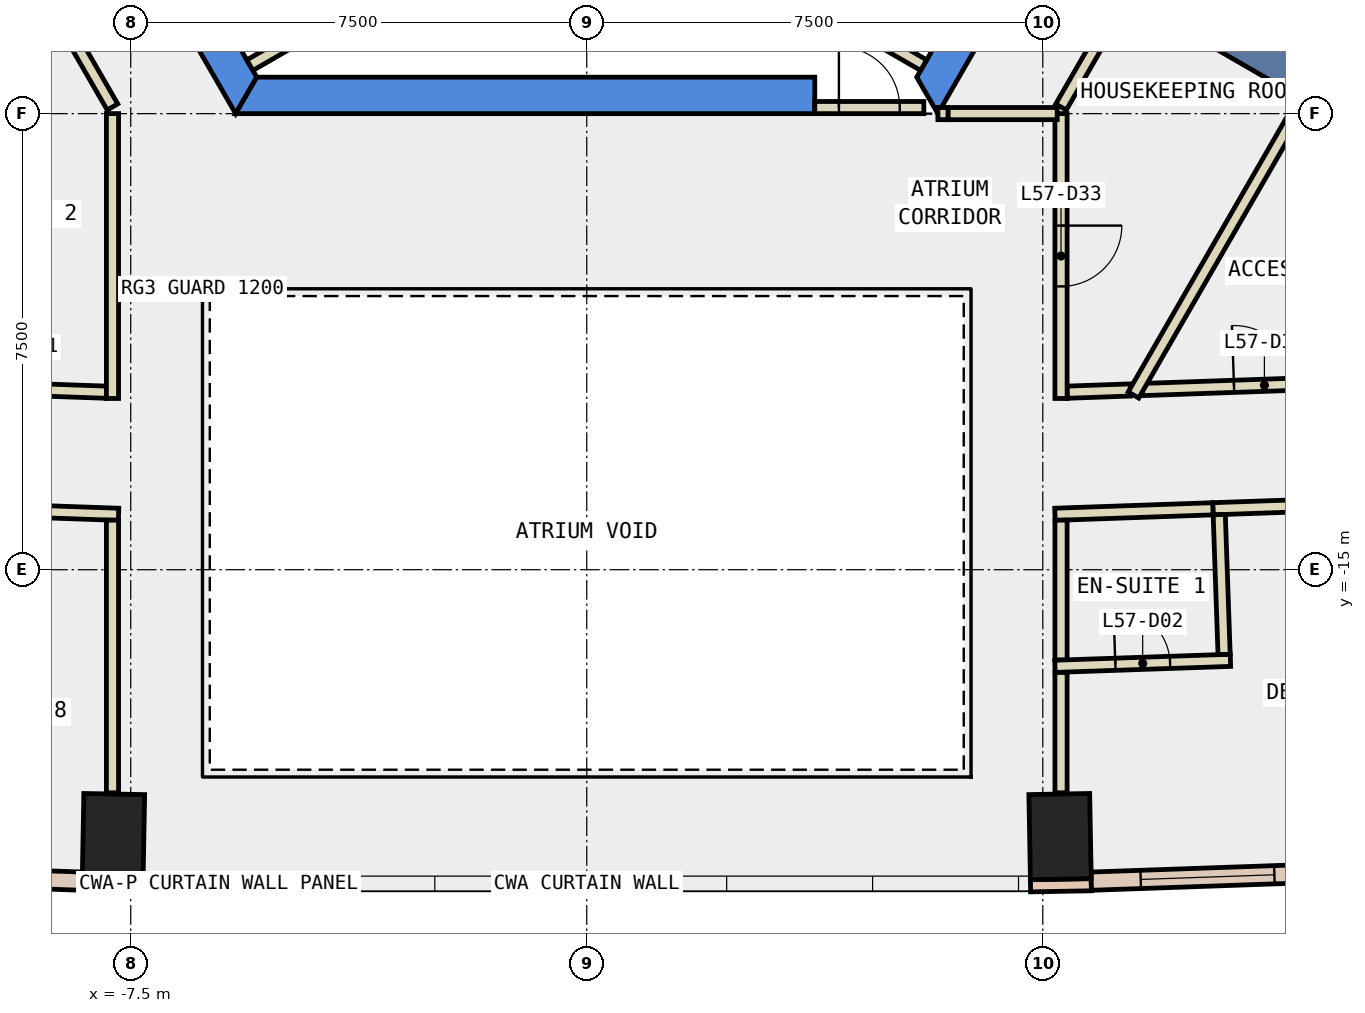
"""IFC4 building model, lengths in metres.
Left out: names, types, materials, properties, quantities, classifications, styles, units other than length and angle.
Written with IfcOpenShell. Run it as: python <this file> out.ifc"""

import sys

from ifc_helpers import new_model, si_unit, direction, frame, frame_2d, origin, origin_2d, place, context, subcontext, project, spatial, polyline, rectangle, outline, extrude, element, fill, save


model = new_model("IFC4")
c1 = context("Model", 3, precision=1e-05, world=origin(), true_north=direction((0.0, 1.0)))
c2 = subcontext(c1, "Body", "Model", "MODEL_VIEW")
j1 = project(units=[si_unit("LENGTHUNIT", "METRE"), si_unit("PLANEANGLEUNIT", "RADIAN")], contexts=[c1])
p1 = place(None, origin())
s1 = spatial("IfcSite", under=j1, at=p1, CompositionType="ELEMENT")
p2 = place(p1, origin())
s2 = spatial("IfcBuilding", under=s1, at=p2, CompositionType="ELEMENT")
p3 = place(p2, frame((0.0, 0.0, 252.2)))
s3 = spatial("IfcBuildingStorey", under=s2, at=p3, CompositionType="ELEMENT", Elevation=252.2)
for number, where, z_axis, x_axis in (
    (1, (-7.784, -19.389, -0.34), (0.0, 0.0, 1.0), (-1.0, 0.018, 0.0)),
    (2, (7.784, -19.389, -0.34), (0.0, 0.0, 1.0), (1.0, 0.018, 0.0)),
):
    element("IfcColumn", number, at=place(p3, frame(where, z_axis=z_axis, x_axis=x_axis)), inside=s3, PredefinedType="COLUMN", context=c2, shape_type="SweptSolid", body=[
        extrude(rectangle(XDim=1.0, YDim=1.4, at=origin_2d()), origin(), (0.0, 0.0, 1.0), 3.6),
    ])
p4 = place(p3, frame((0.0, 0.0, -0.34)))
e3 = element("IfcWall", 3, at=p4, inside=s3, PredefinedType="SHEAR", context=c2, shape_type="SweptSolid", body=[
    extrude(outline(polyline([(-11.547, 2.5), (-5.774, -7.5), (-5.427, -6.9), (-10.854, 2.5), (-11.547, 2.5)])), origin(), (0.0, 0.0, 1.0), 3.6),
])
p5 = place(p3, frame((0.0, 0.0, -0.34)))
e4 = element("IfcWall", 4, at=p5, inside=s3, PredefinedType="SHEAR", context=c2, shape_type="SweptSolid", body=[
    extrude(outline(polyline([(3.75, -7.5), (3.75, -6.9), (-5.427, -6.9), (-5.774, -7.5), (3.75, -7.5)])), origin(), (0.0, 0.0, 1.0), 3.6),
])
p6 = place(p3, frame((0.0, 0.0, -0.34)))
e5 = element("IfcWall", 5, at=p6, inside=s3, PredefinedType="SHEAR", context=c2, shape_type="SweptSolid", body=[
    extrude(outline(polyline([(5.774, -7.5), (11.547, 2.5), (10.854, 2.5), (5.427, -6.9), (5.774, -7.5)])), origin(), (0.0, 0.0, 1.0), 3.6),
])
for number, where, z_axis, x_axis in (
    (6, (7.578, -4.375, -0.34), (0.0, 0.0, 1.0), (0.866, -0.5, 0.0)),
    (7, (-7.578, -4.375, -0.34), (0.0, 0.0, 1.0), (-0.866, -0.5, 0.0)),
):
    element("IfcWall", number, at=place(p3, frame(where, z_axis=z_axis, x_axis=x_axis)), inside=s3, PredefinedType="SHEAR", context=c2, shape_type="SweptSolid", body=[
        extrude(rectangle(XDim=9.0, YDim=0.8, at=frame_2d((4.5, 0.0))), origin(), (0.0, 0.0, 1.0), 3.6),
    ])
for number, where, z_axis, x_axis in (
    (8, (-8.298, -20.18, 0.0), (0.0, 0.0, 1.0), (1.0, -0.018, 0.0)),
    (9, (7.298, -20.198, 0.0), (0.0, 0.0, 1.0), (1.0, 0.018, 0.0)),
):
    element("IfcWall", number, at=place(p3, frame(where, z_axis=z_axis, x_axis=x_axis)), inside=s3, PredefinedType="STANDARD", context=c2, shape_type="SweptSolid", body=[
        extrude(rectangle(XDim=1.0, YDim=0.2, at=frame_2d((0.5, 0.0))), origin(), (0.0, 0.0, 1.0), 3.26),
    ])
p7 = place(p3, frame((-15.952, -19.854, 0.0), z_axis=(0.0, 0.0, 1.0), x_axis=(0.999387577449, -0.034992428331, 0.0)))
e10 = element("IfcWall", 10, at=p7, inside=s3, PredefinedType="STANDARD", context=c2, shape_type="SweptSolid", body=[
    extrude(rectangle(XDim=7.661, YDim=0.3, at=frame_2d((3.83, 0.0))), origin(), (0.0, 0.0, 1.0), 3.26),
])
p8 = place(p7, frame((0.815, 0.0, 0.9)))
e11 = element("IfcOpeningElement", 11, at=p8, cuts=e10, PredefinedType="OPENING", context=c2, shape_type="SweptSolid", body=[
    extrude(rectangle(XDim=2.2, YDim=2.0, at=frame_2d((1.1, 1.0))), frame((0.0, 0.16, 0.0), z_axis=(0.0, -1.0, 0.0), x_axis=(1.0, 0.0, 0.0)), (0.0, 0.0, 1.0), 0.32),
])
p9 = place(p7, frame((4.646, 0.0, 0.9)))
e12 = element("IfcOpeningElement", 12, at=p9, cuts=e10, PredefinedType="OPENING", context=c2, shape_type="SweptSolid", body=[
    extrude(rectangle(XDim=2.2, YDim=2.0, at=frame_2d((1.1, 1.0))), frame((0.0, 0.16, 0.0), z_axis=(0.0, -1.0, 0.0), x_axis=(1.0, 0.0, 0.0)), (0.0, 0.0, 1.0), 0.32),
])
p10 = place(p3, frame((8.296, -20.122, 0.0), z_axis=(0.0, 0.0, 1.0), x_axis=(0.999387577449, 0.034992428331, 0.0)))
e13 = element("IfcWall", 13, at=p10, inside=s3, PredefinedType="STANDARD", context=c2, shape_type="SweptSolid", body=[
    extrude(rectangle(XDim=7.661, YDim=0.3, at=frame_2d((3.83, 0.0))), origin(), (0.0, 0.0, 1.0), 3.26),
])
p11 = place(p10, frame((0.815, 0.0, 0.9)))
e14 = element("IfcOpeningElement", 14, at=p11, cuts=e13, PredefinedType="OPENING", context=c2, shape_type="SweptSolid", body=[
    extrude(rectangle(XDim=2.2, YDim=2.0, at=frame_2d((1.1, 1.0))), frame((0.0, 0.16, 0.0), z_axis=(0.0, -1.0, 0.0), x_axis=(1.0, 0.0, 0.0)), (0.0, 0.0, 1.0), 0.32),
])
p12 = place(p10, frame((4.646, 0.0, 0.9)))
e15 = element("IfcOpeningElement", 15, at=p12, cuts=e13, PredefinedType="OPENING", context=c2, shape_type="SweptSolid", body=[
    extrude(rectangle(XDim=2.2, YDim=2.0, at=frame_2d((1.1, 1.0))), frame((0.0, 0.16, 0.0), z_axis=(0.0, -1.0, 0.0), x_axis=(1.0, 0.0, 0.0)), (0.0, 0.0, 1.0), 0.32),
])
p13 = place(p3, frame((7.9, -12.081, 0.0), z_axis=(0.0, 0.0, 1.0), x_axis=(0.999365240621, 0.035624652105, 0.0)))
e16 = element("IfcWall", 16, at=p13, inside=s3, PredefinedType="PARTITIONING", context=c2, shape_type="SweptSolid", body=[
    extrude(rectangle(XDim=1.042, YDim=0.2, at=frame_2d((0.521, 0.0))), origin(), (0.0, 0.0, 1.0), 3.26),
])
p14 = place(p3, frame((9.141, -12.037, 0.0), z_axis=(0.0, 0.0, 1.0), x_axis=(0.999388955878, 0.034953038062, 0.0)))
e17 = element("IfcWall", 17, at=p14, inside=s3, PredefinedType="PARTITIONING", context=c2, shape_type="SweptSolid", body=[
    extrude(rectangle(XDim=4.009, YDim=0.2, at=frame_2d((2.005, 0.0))), origin(), (0.0, 0.0, 1.0), 3.26),
])
p15 = place(p14, frame((1.505, 0.0, 0.0)))
e18 = element("IfcOpeningElement", 18, at=p15, cuts=e17, PredefinedType="OPENING", context=c2, shape_type="SweptSolid", body=[
    extrude(rectangle(XDim=1.0, YDim=2.1, at=frame_2d((0.5, 1.05))), frame((0.0, 0.11, 0.0), z_axis=(0.0, -1.0, 0.0), x_axis=(1.0, 0.0, 0.0)), (0.0, 0.0, 1.0), 0.22),
])
p16 = place(p3, frame((-7.8, -7.39, 0.0), z_axis=(0.0, 0.0, 1.0), x_axis=(-0.500266477503, 0.865871498253, 0.0)))
e19 = element("IfcWall", 19, at=p16, inside=s3, PredefinedType="PARTITIONING", context=c2, shape_type="SweptSolid", body=[
    extrude(rectangle(XDim=1.463, YDim=0.2, at=frame_2d((0.731, 0.0))), origin(), (0.0, 0.0, 1.0), 3.26),
])
p17 = place(p3, frame((-10.826, -11.978, 0.0), z_axis=(0.0, 0.0, 1.0), x_axis=(0.999380679818, -0.035188873332, 0.0)))
e20 = element("IfcWall", 20, at=p17, inside=s3, PredefinedType="PARTITIONING", context=c2, shape_type="SweptSolid", body=[
    extrude(rectangle(XDim=2.928, YDim=0.2, at=frame_2d((1.464, 0.0))), origin(), (0.0, 0.0, 1.0), 3.26),
])
p18 = place(p17, frame((0.964, 0.0, 0.0)))
e21 = element("IfcOpeningElement", 21, at=p18, cuts=e20, PredefinedType="OPENING", context=c2, shape_type="SweptSolid", body=[
    extrude(rectangle(XDim=1.0, YDim=2.1, at=frame_2d((0.5, 1.05))), frame((0.0, 0.11, 0.0), z_axis=(0.0, -1.0, 0.0), x_axis=(1.0, 0.0, 0.0)), (0.0, 0.0, 1.0), 0.22),
])
p19 = place(p3, frame((15.559, -13.814, 0.0), z_axis=(0.0, 0.0, 1.0), x_axis=(-0.999388410674, -0.034968623214, 0.0)))
e22 = element("IfcWall", 22, at=p19, inside=s3, PredefinedType="PARTITIONING", context=c2, shape_type="SweptSolid", body=[
    extrude(rectangle(XDim=5.264, YDim=0.2, at=frame_2d((2.632, 0.0))), origin(), (0.0, 0.0, 1.0), 3.26),
])
p20 = place(p19, frame((2.182, 0.0, 0.0)))
e23 = element("IfcOpeningElement", 23, at=p20, cuts=e22, PredefinedType="OPENING", context=c2, shape_type="SweptSolid", body=[
    extrude(rectangle(XDim=1.0, YDim=2.1, at=frame_2d((0.5, 1.05))), frame((0.0, 0.11, 0.0), z_axis=(0.0, -1.0, 0.0), x_axis=(1.0, 0.0, 0.0)), (0.0, 0.0, 1.0), 0.22),
])
p21 = place(p3, frame((10.298, -13.998, 0.0), z_axis=(0.0, 0.0, 1.0), x_axis=(-0.999386321032, -0.035028293342, 0.0)))
e24 = element("IfcWall", 24, at=p21, inside=s3, PredefinedType="PARTITIONING", context=c2, shape_type="SweptSolid", body=[
    extrude(rectangle(XDim=2.6, YDim=0.2, at=frame_2d((1.3, 0.0))), origin(), (0.0, 0.0, 1.0), 3.26),
])
p22 = place(p3, frame((-7.7, -14.089, 0.0), z_axis=(0.0, 0.0, 1.0), x_axis=(-0.999388410674, 0.034968623214, 0.0)))
e25 = element("IfcWall", 25, at=p22, inside=s3, PredefinedType="PARTITIONING", context=c2, shape_type="SweptSolid", body=[
    extrude(rectangle(XDim=5.264, YDim=0.2, at=frame_2d((2.632, 0.0))), origin(), (0.0, 0.0, 1.0), 3.26),
])
p23 = place(p22, frame((2.182, 0.0, 0.0)))
e26 = element("IfcOpeningElement", 26, at=p23, cuts=e25, PredefinedType="OPENING", context=c2, shape_type="SweptSolid", body=[
    extrude(rectangle(XDim=1.0, YDim=2.1, at=frame_2d((0.5, 1.05))), frame((0.0, 0.11, 0.0), z_axis=(0.0, -1.0, 0.0), x_axis=(1.0, 0.0, 0.0)), (0.0, 0.0, 1.0), 0.22),
])
for number, where, z_axis, x_axis in (
    (27, (5.541, -6.703, 0.0), (0.0, 0.0, 1.0), (-0.866, 0.5, 0.0)),
    (28, (-4.588, -6.153, 0.0), (0.0, 0.0, 1.0), (-0.866, -0.5, 0.0)),
):
    element("IfcWall", number, at=place(p3, frame(where, z_axis=z_axis, x_axis=x_axis)), inside=s3, PredefinedType="PARTITIONING", context=c2, shape_type="SweptSolid", body=[
        extrude(rectangle(XDim=1.1, YDim=0.2, at=frame_2d((0.55, 0.0))), origin(), (0.0, 0.0, 1.0), 3.26),
    ])
p24 = place(p3, frame((5.775, -7.499, 0.0), z_axis=(0.0, 0.0, 1.0), x_axis=(1.0, 0.0, 0.0)))
e29 = element("IfcWall", 29, at=p24, inside=s3, PredefinedType="PARTITIONING", context=c2, shape_type="SweptSolid", body=[
    extrude(rectangle(XDim=0.169, YDim=0.2, at=frame_2d((0.084, 0.0))), origin(), (0.0, 0.0, 1.0), 2.4),
])
p25 = place(p3, frame((7.8, -7.39, 0.0), z_axis=(0.0, 0.0, 1.0), x_axis=(0.499977374825, 0.866038466041, 0.0)))
e30 = element("IfcWall", 30, at=p25, inside=s3, PredefinedType="PARTITIONING", context=c2, shape_type="SweptSolid", body=[
    extrude(rectangle(XDim=2.1, YDim=0.2, at=frame_2d((1.05, 0.0))), origin(), (0.0, 0.0, 1.0), 3.26),
])
p26 = place(p3, frame((7.8, -7.499, 0.0), z_axis=(0.0, 0.0, 1.0), x_axis=(0.0, -1.0, 0.0)))
e31 = element("IfcWall", 31, at=p26, inside=s3, PredefinedType="PARTITIONING", context=c2, shape_type="SweptSolid", body=[
    extrude(rectangle(XDim=4.685, YDim=0.2, at=frame_2d((2.343, 0.0))), origin(), (0.0, 0.0, 1.0), 3.26),
])
p27 = place(p26, frame((1.842, 0.0, 0.0)))
e32 = element("IfcOpeningElement", 32, at=p27, cuts=e31, PredefinedType="OPENING", context=c2, shape_type="SweptSolid", body=[
    extrude(rectangle(XDim=1.0, YDim=2.1, at=frame_2d((0.5, 1.05))), frame((0.0, 0.11, 0.0), z_axis=(0.0, -1.0, 0.0), x_axis=(1.0, 0.0, 0.0)), (0.0, 0.0, 1.0), 0.22),
])
p28 = place(p3, frame((-7.8, -12.184, 0.0), z_axis=(0.0, 0.0, 1.0), x_axis=(0.0, 1.0, 0.0)))
e33 = element("IfcWall", 33, at=p28, inside=s3, PredefinedType="PARTITIONING", context=c2, shape_type="SweptSolid", body=[
    extrude(rectangle(XDim=4.685, YDim=0.2, at=frame_2d((2.343, 0.0))), origin(), (0.0, 0.0, 1.0), 3.26),
])
p29 = place(p3, frame((7.8, -16.686, 0.0), z_axis=(0.0, 0.0, 1.0), x_axis=(0.0, -1.0, 0.0)))
e34 = element("IfcWall", 34, at=p29, inside=s3, PredefinedType="PARTITIONING", context=c2, shape_type="SweptSolid", body=[
    extrude(rectangle(XDim=1.983, YDim=0.2, at=frame_2d((0.991, 0.0))), origin(), (0.0, 0.0, 1.0), 3.26),
])
p30 = place(p3, frame((7.8, -14.185, 0.0), z_axis=(0.0, 0.0, 1.0), x_axis=(0.0, -1.0, 0.0)))
e35 = element("IfcWall", 35, at=p30, inside=s3, PredefinedType="PARTITIONING", context=c2, shape_type="SweptSolid", body=[
    extrude(rectangle(XDim=2.301, YDim=0.2, at=frame_2d((1.15, 0.0))), origin(), (0.0, 0.0, 1.0), 3.26),
])
p31 = place(p3, frame((-7.8, -18.669, 0.0), z_axis=(0.0, 0.0, 1.0), x_axis=(0.0, 1.0, 0.0)))
e36 = element("IfcWall", 36, at=p31, inside=s3, PredefinedType="PARTITIONING", context=c2, shape_type="SweptSolid", body=[
    extrude(rectangle(XDim=4.484, YDim=0.2, at=frame_2d((2.242, 0.0))), origin(), (0.0, 0.0, 1.0), 3.26),
])
p32 = place(p3, frame((9.335, -4.732, 0.0), z_axis=(0.0, 0.0, 1.0), x_axis=(0.866002606077, -0.500039484709, 0.0)))
e37 = element("IfcWall", 37, at=p32, inside=s3, PredefinedType="PARTITIONING", context=c2, shape_type="SweptSolid", body=[
    extrude(rectangle(XDim=3.4, YDim=0.2, at=frame_2d((1.7, 0.0))), origin(), (0.0, 0.0, 1.0), 3.26),
])
p33 = place(p3, frame((11.794, -7.271, 0.0), z_axis=(0.0, 0.0, 1.0), x_axis=(-0.499918457185, -0.866072477433, 0.0)))
e38 = element("IfcWall", 38, at=p33, inside=s3, PredefinedType="PARTITIONING", context=c2, shape_type="SweptSolid", body=[
    extrude(rectangle(XDim=5.607, YDim=0.2, at=frame_2d((2.803, 0.0))), origin(), (0.0, 0.0, 1.0), 3.26),
])
p34 = place(p3, frame((-8.582, -6.036, 0.0), z_axis=(0.0, 0.0, 1.0), x_axis=(-0.897105141673, -0.441817116897, 0.0)))
e39 = element("IfcWall", 39, at=p34, inside=s3, PredefinedType="PARTITIONING", context=c2, shape_type="SweptSolid", body=[
    extrude(rectangle(XDim=5.111, YDim=0.2, at=frame_2d((2.555, 0.0))), origin(), (0.0, 0.0, 1.0), 3.26),
])
p35 = place(p3, frame((7.7, -16.589, 0.0), z_axis=(0.0, 0.0, 1.0), x_axis=(0.999410709261, 0.034325416459, 0.0)))
e40 = element("IfcWall", 40, at=p35, inside=s3, PredefinedType="PARTITIONING", context=c2, shape_type="SweptSolid", body=[
    extrude(rectangle(XDim=2.888, YDim=0.2, at=frame_2d((1.444, 0.0))), origin(), (0.0, 0.0, 1.0), 3.26),
])
p36 = place(p35, frame((0.994, 0.0, 0.0)))
e41 = element("IfcOpeningElement", 41, at=p36, cuts=e40, PredefinedType="OPENING", context=c2, shape_type="SweptSolid", body=[
    extrude(rectangle(XDim=0.9, YDim=2.1, at=frame_2d((0.45, 1.05))), frame((0.0, 0.11, 0.0), z_axis=(0.0, -1.0, 0.0), x_axis=(1.0, 0.0, 0.0)), (0.0, 0.0, 1.0), 0.22),
])
p37 = place(p3, frame((10.482, -16.393, 0.0), z_axis=(0.0, 0.0, 1.0), x_axis=(-0.034703518322, 0.999397651496, 0.0)))
e42 = element("IfcWall", 42, at=p37, inside=s3, PredefinedType="PARTITIONING", context=c2, shape_type="SweptSolid", body=[
    extrude(rectangle(XDim=2.301, YDim=0.2, at=frame_2d((1.15, 0.0))), origin(), (0.0, 0.0, 1.0), 3.26),
])
p38 = place(p3, frame((3.75, -7.4, 0.0), z_axis=(0.0, 0.0, 1.0), x_axis=(1.0, 0.0, 0.0)))
e43 = element("IfcWall", 43, at=p38, inside=s3, PredefinedType="PARTITIONING", context=c2, shape_type="SweptSolid", body=[
    extrude(rectangle(XDim=1.794, YDim=0.2, at=frame_2d((0.897, 0.0))), origin(), (0.0, 0.0, 1.0), 2.4),
])
p39 = place(p38, frame((0.397, 0.0, 0.0)))
e44 = element("IfcOpeningElement", 44, at=p39, cuts=e43, PredefinedType="OPENING", context=c2, shape_type="SweptSolid", body=[
    extrude(rectangle(XDim=1.0, YDim=2.1, at=frame_2d((0.5, 1.05))), frame((0.0, 0.11, 0.0), z_axis=(0.0, -1.0, 0.0), x_axis=(1.0, 0.0, 0.0)), (0.0, 0.0, 1.0), 0.22),
])
p40 = place(p3, frame((5.944, -7.499, 0.0), z_axis=(0.0, 0.0, 1.0), x_axis=(1.0, 0.0, 0.0)))
e45 = element("IfcWall", 45, at=p40, inside=s3, PredefinedType="PARTITIONING", context=c2, shape_type="SweptSolid", body=[
    extrude(rectangle(XDim=1.793, YDim=0.2, at=frame_2d((0.896, 0.0))), origin(), (0.0, 0.0, 1.0), 3.26),
])
p41 = place(p11, origin())
e46 = element("IfcWindow", 46, at=p41, inside=s3, PartitioningType="SINGLE_PANEL", PredefinedType="WINDOW", context=c2, shape_type="SweptSolid", body=[
    extrude(rectangle(XDim=2.2, YDim=2.0, at=frame_2d((1.1, 1.0))), frame((0.0, 0.03, 0.0), z_axis=(0.0, -1.0, 0.0), x_axis=(1.0, 0.0, 0.0)), (0.0, 0.0, 1.0), 0.06),
])
fill(e14, e46)
p42 = place(p36, origin())
e47 = element("IfcDoor", 47, at=p42, inside=s3, OperationType="SINGLE_SWING_LEFT", PredefinedType="DOOR", context=c2, shape_type="SweptSolid", body=[
    extrude(rectangle(XDim=0.9, YDim=2.1, at=frame_2d((0.45, 1.05))), frame((0.0, 0.025, 0.0), z_axis=(0.0, -1.0, 0.0), x_axis=(1.0, 0.0, 0.0)), (0.0, 0.0, 1.0), 0.05),
])
fill(e41, e47)
p43 = place(p27, origin())
e48 = element("IfcDoor", 48, at=p43, inside=s3, OperationType="SINGLE_SWING_LEFT", PredefinedType="DOOR", context=c2, shape_type="SweptSolid", body=[
    extrude(rectangle(XDim=1.0, YDim=2.1, at=frame_2d((0.5, 1.05))), frame((0.0, 0.025, 0.0), z_axis=(0.0, -1.0, 0.0), x_axis=(1.0, 0.0, 0.0)), (0.0, 0.0, 1.0), 0.05),
])
fill(e32, e48)
p44 = place(p15, origin())
e49 = element("IfcDoor", 49, at=p44, inside=s3, OperationType="SINGLE_SWING_LEFT", PredefinedType="DOOR", context=c2, shape_type="SweptSolid", body=[
    extrude(rectangle(XDim=1.0, YDim=2.1, at=frame_2d((0.5, 1.05))), frame((0.0, 0.025, 0.0), z_axis=(0.0, -1.0, 0.0), x_axis=(1.0, 0.0, 0.0)), (0.0, 0.0, 1.0), 0.05),
])
fill(e18, e49)
p45 = place(p39, origin())
e50 = element("IfcDoor", 50, at=p45, inside=s3, OperationType="SINGLE_SWING_LEFT", PredefinedType="DOOR", context=c2, shape_type="SweptSolid", body=[
    extrude(rectangle(XDim=1.0, YDim=2.1, at=frame_2d((0.5, 1.05))), frame((0.0, 0.025, 0.0), z_axis=(0.0, -1.0, 0.0), x_axis=(1.0, 0.0, 0.0)), (0.0, 0.0, 1.0), 0.05),
])
fill(e44, e50)
save(model, sys.argv[1])
